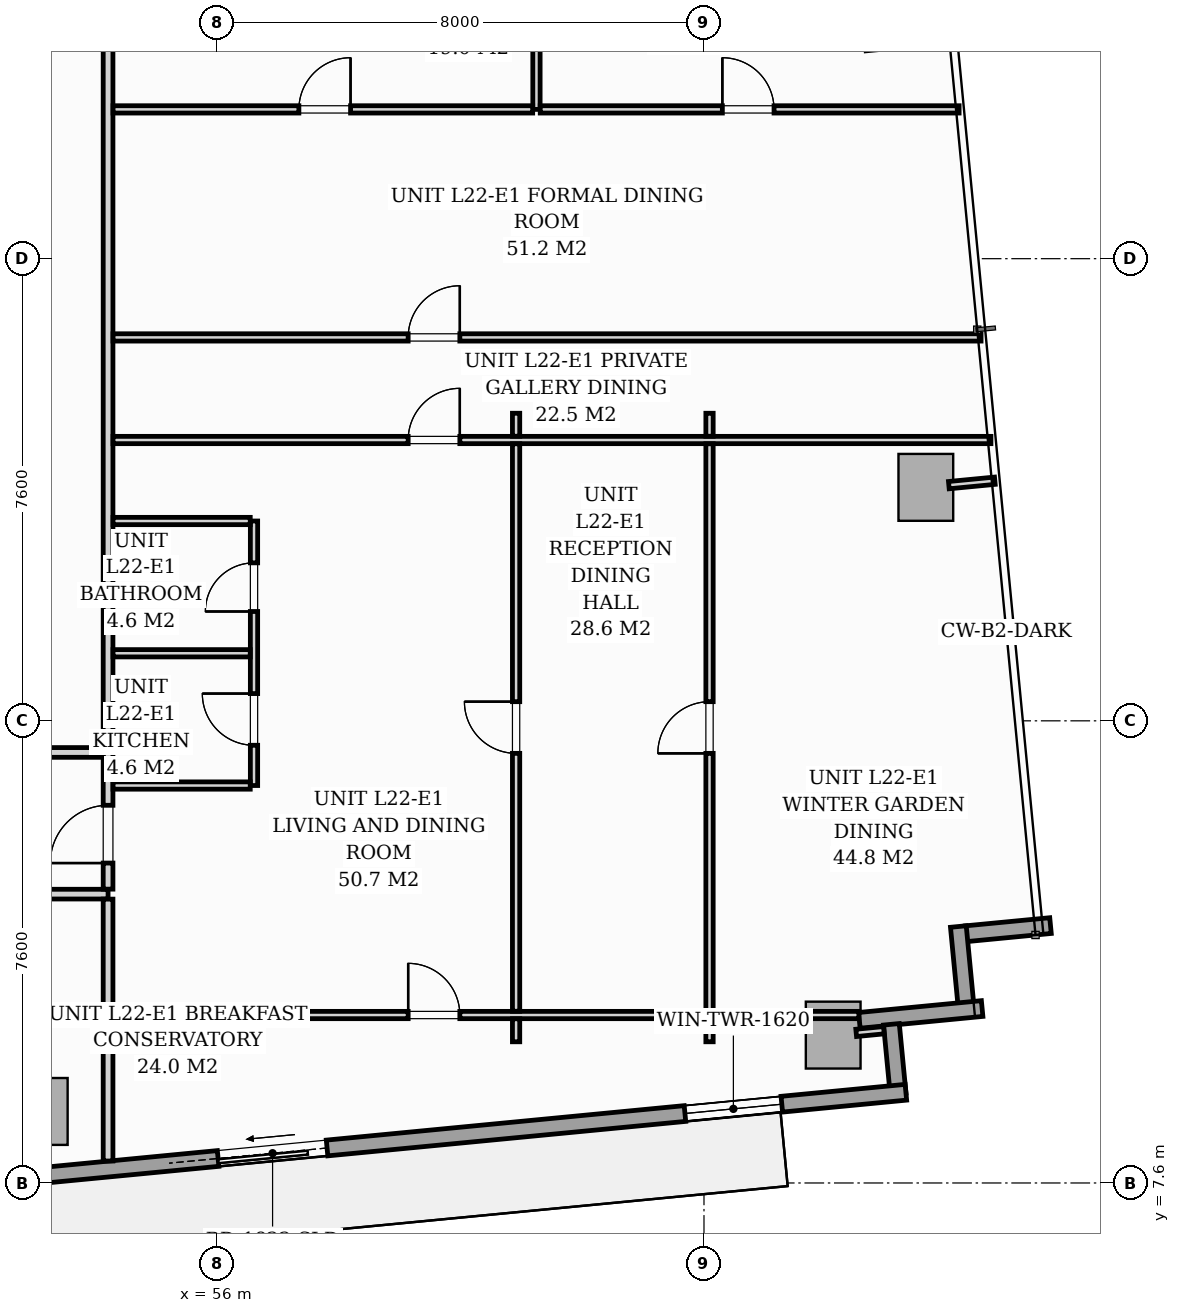
"""IFC4 building model, lengths in metres.
Left out: names, types, materials, properties, quantities, classifications, styles, units other than length and angle.
Written with IfcOpenShell. Run it as: python <this file> out.ifc"""

import sys

from ifc_helpers import new_model, si_unit, direction, frame, frame_2d, origin, origin_2d, place, context, subcontext, project, spatial, rectangle, extrude, source, transform, mapped, element, fill, save


model = new_model("IFC4")
c1 = context("Model", 3, precision=1e-05, world=origin(), true_north=direction((0.0, 1.0)))
c2 = subcontext(c1, "Body", "Model", "MODEL_VIEW")
j1 = project(units=[si_unit("LENGTHUNIT", "METRE"), si_unit("PLANEANGLEUNIT", "RADIAN")], contexts=[c1])
p1 = place(None, origin())
s1 = spatial("IfcSite", under=j1, at=p1, CompositionType="ELEMENT")
p2 = place(p1, origin())
s2 = spatial("IfcBuilding", under=s1, at=p2, CompositionType="ELEMENT")
p3 = place(p2, frame((0.0, 0.0, 81.0)))
s3 = spatial("IfcBuildingStorey", under=s2, at=p3, CompositionType="ELEMENT", Elevation=81.0)
m1 = source(origin(), c2, "Body", "SweptSolid", [
    extrude(rectangle(XDim=0.9, YDim=1.1, at=origin_2d()), origin(), (0.0, 0.0, 1.0), 3.196),
])
for number, where, z_axis, x_axis in (
    (1, (53.085, 8.776, 0.002), (0.0, 0.0, 1.0), (0.995, 0.096, 0.0)),
    (2, (66.125, 10.032, 0.002), (0.0, 0.0, 1.0), (0.995, 0.096, 0.0)),
    (3, (67.648, 19.039, 0.002), (0.0, 0.0, 1.0), (0.995, 0.096, 0.0)),
):
    element("IfcColumn", number, at=place(p3, frame(where, z_axis=z_axis, x_axis=x_axis)), inside=s3, PredefinedType="COLUMN", context=c2, shape_type="MappedRepresentation", body=[
        mapped(m1, transform((0.0, 0.0, 0.0), scale=1.0)),
    ])
for number, where, z_axis, x_axis in (
    (4, (69.698, 11.833, 0.0), (0.0, 0.0, 1.0), (-0.995, -0.096, 0.0)),
    (5, (68.183, 11.817, 0.0), (0.0, 0.0, 1.0), (0.096, -0.995, 0.0)),
):
    element("IfcWall", number, at=place(p3, frame(where, z_axis=z_axis, x_axis=x_axis)), inside=s3, PredefinedType="STANDARD", context=c2, shape_type="SweptSolid", body=[
        extrude(rectangle(XDim=1.395, YDim=0.26, at=frame_2d((0.697, 0.0))), origin(), (0.0, 0.0, 1.0), 2.94),
    ])
p4 = place(p3, frame((68.574, 10.469, 0.0), z_axis=(0.0, 0.0, 1.0), x_axis=(-0.99539865733, -0.095820211783, 0.0)))
e6 = element("IfcWall", 6, at=p4, inside=s3, PredefinedType="STANDARD", context=c2, shape_type="SweptSolid", body=[
    extrude(rectangle(XDim=2.028, YDim=0.26, at=frame_2d((1.014, 0.0))), origin(), (0.0, 0.0, 1.0), 2.94),
])
p5 = place(p3, frame((67.082, 10.209, 0.0), z_axis=(0.0, 0.0, 1.0), x_axis=(0.09576095695, -0.995404359607, 0.0)))
e7 = element("IfcWall", 7, at=p5, inside=s3, PredefinedType="STANDARD", context=c2, shape_type="SweptSolid", body=[
    extrude(rectangle(XDim=1.15, YDim=0.26, at=frame_2d((0.575, 0.0))), origin(), (0.0, 0.0, 1.0), 2.94),
])
p6 = place(p3, frame((67.32, 9.092, 0.0), z_axis=(0.0, 0.0, 1.0), x_axis=(-0.995396521236, -0.095842399342, 0.0)))
e8 = element("IfcWall", 8, at=p6, inside=s3, PredefinedType="STANDARD", context=c2, shape_type="SweptSolid", body=[
    extrude(rectangle(XDim=19.11, YDim=0.26, at=frame_2d((9.555, 0.0))), origin(), (0.0, 0.0, 1.0), 2.94),
])
p7 = place(p6, frame((9.563, 0.0, 0.0)))
e9 = element("IfcOpeningElement", 9, at=p7, cuts=e8, PredefinedType="OPENING", context=c2, shape_type="SweptSolid", body=[
    extrude(rectangle(XDim=1.8, YDim=2.06, at=frame_2d((0.9, 1.03))), frame((0.0, 0.14, 0.0), z_axis=(0.0, -1.0, 0.0), x_axis=(1.0, 0.0, 0.0)), (0.0, 0.0, 1.0), 0.28),
])
p8 = place(p6, frame((2.05, 0.0, 0.65)))
e10 = element("IfcOpeningElement", 10, at=p8, cuts=e8, PredefinedType="OPENING", context=c2, shape_type="SweptSolid", body=[
    extrude(rectangle(XDim=1.6, YDim=1.5, at=frame_2d((0.8, 0.75))), frame((0.0, 0.14, 0.0), z_axis=(0.0, -1.0, 0.0), x_axis=(1.0, 0.0, 0.0)), (0.0, 0.0, 1.0), 0.28),
])
p9 = place(p6, frame((14.465, 0.0, 0.75)))
e11 = element("IfcOpeningElement", 11, at=p9, cuts=e8, PredefinedType="OPENING", context=c2, shape_type="SweptSolid", body=[
    extrude(rectangle(XDim=1.6, YDim=1.5, at=frame_2d((0.8, 0.75))), frame((0.0, 0.14, 0.0), z_axis=(0.0, -1.0, 0.0), x_axis=(1.0, 0.0, 0.0)), (0.0, 0.0, 1.0), 0.28),
])
p10 = place(p3, frame((16.6, 12.35, 0.0), z_axis=(0.0, 0.0, 1.0), x_axis=(1.0, 0.0, 0.0)))
e12 = element("IfcWall", 12, at=p10, inside=s3, PredefinedType="PARTITIONING", context=c2, shape_type="SweptSolid", body=[
    extrude(rectangle(XDim=37.6, YDim=0.16, at=frame_2d((18.8, 0.0))), origin(), (0.0, 0.0, 1.0), 2.94),
])
p11 = place(p10, frame((2.091, 0.0, 0.0)))
e13 = element("IfcOpeningElement", 13, at=p11, cuts=e12, PredefinedType="OPENING", context=c2, shape_type="SweptSolid", body=[
    extrude(rectangle(XDim=0.95, YDim=2.06, at=frame_2d((0.475, 1.03))), frame((0.0, 0.09, 0.0), z_axis=(0.0, -1.0, 0.0), x_axis=(1.0, 0.0, 0.0)), (0.0, 0.0, 1.0), 0.18),
])
p12 = place(p10, frame((26.146, 0.0, 0.0)))
e14 = element("IfcOpeningElement", 14, at=p12, cuts=e12, PredefinedType="OPENING", context=c2, shape_type="SweptSolid", body=[
    extrude(rectangle(XDim=0.95, YDim=2.06, at=frame_2d((0.475, 1.03))), frame((0.0, 0.09, 0.0), z_axis=(0.0, -1.0, 0.0), x_axis=(1.0, 0.0, 0.0)), (0.0, 0.0, 1.0), 0.18),
])
p13 = place(p3, frame((54.2, 7.961, 0.0), z_axis=(0.0, 0.0, 1.0), x_axis=(0.0, 1.0, 0.0)))
e15 = element("IfcWall", 15, at=p13, inside=s3, PredefinedType="PARTITIONING", context=c2, shape_type="SweptSolid", body=[
    extrude(rectangle(XDim=4.307, YDim=0.16, at=frame_2d((2.153, 0.0))), origin(), (0.0, 0.0, 1.0), 2.94),
])
p14 = place(p3, frame((54.2, 12.432, 0.0), z_axis=(0.0, 0.0, 1.0), x_axis=(0.0, 1.0, 0.0)))
e16 = element("IfcWall", 16, at=p14, inside=s3, PredefinedType="PARTITIONING", context=c2, shape_type="SweptSolid", body=[
    extrude(rectangle(XDim=15.095, YDim=0.16, at=frame_2d((7.548, 0.0))), origin(), (0.0, 0.0, 1.0), 2.94),
])
p15 = place(p14, frame((0.429, 0.0, 0.0)))
e17 = element("IfcOpeningElement", 17, at=p15, cuts=e16, PredefinedType="OPENING", context=c2, shape_type="SweptSolid", body=[
    extrude(rectangle(XDim=0.95, YDim=2.06, at=frame_2d((0.475, 1.03))), frame((0.0, 0.09, 0.0), z_axis=(0.0, -1.0, 0.0), x_axis=(1.0, 0.0, 0.0)), (0.0, 0.0, 1.0), 0.18),
])
p16 = place(p3, frame((56.6, 14.136, 0.0), z_axis=(0.0, 0.0, 1.0), x_axis=(0.0, 1.0, 0.0)))
e18 = element("IfcWall", 18, at=p16, inside=s3, PredefinedType="PARTITIONING", context=c2, shape_type="SweptSolid", body=[
    extrude(rectangle(XDim=4.35, YDim=0.12, at=frame_2d((2.175, 0.0))), origin(), (0.0, 0.0, 1.0), 2.94),
])
p17 = place(p16, frame((0.662, 0.0, 0.0)))
e19 = element("IfcOpeningElement", 19, at=p17, cuts=e18, PredefinedType="OPENING", context=c2, shape_type="SweptSolid", body=[
    extrude(rectangle(XDim=0.85, YDim=2.05, at=frame_2d((0.425, 1.025))), frame((0.0, 0.07, 0.0), z_axis=(0.0, -1.0, 0.0), x_axis=(1.0, 0.0, 0.0)), (0.0, 0.0, 1.0), 0.14),
])
p18 = place(p16, frame((2.862, 0.0, 0.0)))
e20 = element("IfcOpeningElement", 20, at=p18, cuts=e18, PredefinedType="OPENING", context=c2, shape_type="SweptSolid", body=[
    extrude(rectangle(XDim=0.8, YDim=2.02, at=frame_2d((0.4, 1.01))), frame((0.0, 0.07, 0.0), z_axis=(0.0, -1.0, 0.0), x_axis=(1.0, 0.0, 0.0)), (0.0, 0.0, 1.0), 0.14),
])
for number, where, z_axis, x_axis in (
    (21, (54.282, 16.311, 0.0), (0.0, 0.0, 1.0), (1.0, 0.0, 0.0)),
    (22, (54.282, 14.136, 0.0), (0.0, 0.0, 1.0), (1.0, 0.0, 0.0)),
    (23, (54.282, 18.486, 0.0), (0.0, 0.0, 1.0), (1.0, 0.0, 0.0)),
):
    element("IfcWall", number, at=place(p3, frame(where, z_axis=z_axis, x_axis=x_axis)), inside=s3, PredefinedType="PARTITIONING", context=c2, shape_type="SweptSolid", body=[
        extrude(rectangle(XDim=2.256, YDim=0.12, at=frame_2d((1.128, 0.0))), origin(), (0.0, 0.0, 1.0), 2.94),
    ])
p19 = place(p3, frame((61.245, 25.255, 0.0), z_axis=(0.0, 0.0, 1.0), x_axis=(0.0, 1.0, 0.0)))
e24 = element("IfcWall", 24, at=p19, inside=s3, PredefinedType="PARTITIONING", context=c2, shape_type="SweptSolid", body=[
    extrude(rectangle(XDim=2.951, YDim=0.12, at=frame_2d((1.476, 0.0))), origin(), (0.0, 0.0, 1.0), 2.94),
])
p20 = place(p3, frame((54.282, 25.255, 0.0), z_axis=(0.0, 0.0, 1.0), x_axis=(1.0, 0.0, 0.0)))
e25 = element("IfcWall", 25, at=p20, inside=s3, PredefinedType="PARTITIONING", context=c2, shape_type="SweptSolid", body=[
    extrude(rectangle(XDim=6.901, YDim=0.12, at=frame_2d((3.451, 0.0))), origin(), (0.0, 0.0, 1.0), 2.94),
])
p21 = place(p20, frame((3.056, 0.0, 0.0)))
e26 = element("IfcOpeningElement", 26, at=p21, cuts=e25, PredefinedType="OPENING", context=c2, shape_type="SweptSolid", body=[
    extrude(rectangle(XDim=0.85, YDim=2.05, at=frame_2d((0.425, 1.025))), frame((0.0, 0.07, 0.0), z_axis=(0.0, -1.0, 0.0), x_axis=(1.0, 0.0, 0.0)), (0.0, 0.0, 1.0), 0.14),
])
p22 = place(p3, frame((61.307, 25.255, 0.0), z_axis=(0.0, 0.0, 1.0), x_axis=(1.0, 0.0, 0.0)))
e27 = element("IfcWall", 27, at=p22, inside=s3, PredefinedType="PARTITIONING", context=c2, shape_type="SweptSolid", body=[
    extrude(rectangle(XDim=6.888, YDim=0.12, at=frame_2d((3.444, 0.0))), origin(), (0.0, 0.0, 1.0), 2.94),
])
p23 = place(p22, frame((2.995, 0.0, 0.0)))
e28 = element("IfcOpeningElement", 28, at=p23, cuts=e27, PredefinedType="OPENING", context=c2, shape_type="SweptSolid", body=[
    extrude(rectangle(XDim=0.85, YDim=2.05, at=frame_2d((0.425, 1.025))), frame((0.0, 0.07, 0.0), z_axis=(0.0, -1.0, 0.0), x_axis=(1.0, 0.0, 0.0)), (0.0, 0.0, 1.0), 0.14),
])
p24 = place(p3, frame((54.282, 21.505, 0.0), z_axis=(0.0, 0.0, 1.0), x_axis=(1.0, 0.0, 0.0)))
e29 = element("IfcWall", 29, at=p24, inside=s3, PredefinedType="PARTITIONING", context=c2, shape_type="SweptSolid", body=[
    extrude(rectangle(XDim=14.274, YDim=0.12, at=frame_2d((7.137, 0.0))), origin(), (0.0, 0.0, 1.0), 2.94),
])
p25 = place(p24, frame((4.853, 0.0, 0.0)))
e30 = element("IfcOpeningElement", 30, at=p25, cuts=e29, PredefinedType="OPENING", context=c2, shape_type="SweptSolid", body=[
    extrude(rectangle(XDim=0.85, YDim=2.05, at=frame_2d((0.425, 1.025))), frame((0.0, 0.07, 0.0), z_axis=(0.0, -1.0, 0.0), x_axis=(1.0, 0.0, 0.0)), (0.0, 0.0, 1.0), 0.14),
])
p26 = place(p3, frame((54.282, 10.362, 0.0), z_axis=(0.0, 0.0, 1.0), x_axis=(1.0, 0.0, 0.0)))
e31 = element("IfcWall", 31, at=p26, inside=s3, PredefinedType="PARTITIONING", context=c2, shape_type="SweptSolid", body=[
    extrude(rectangle(XDim=12.265, YDim=0.12, at=frame_2d((6.132, 0.0))), origin(), (0.0, 0.0, 1.0), 2.94),
])
p27 = place(p26, frame((4.853, 0.0, 0.0)))
e32 = element("IfcOpeningElement", 32, at=p27, cuts=e31, PredefinedType="OPENING", context=c2, shape_type="SweptSolid", body=[
    extrude(rectangle(XDim=0.85, YDim=2.05, at=frame_2d((0.425, 1.025))), frame((0.0, 0.07, 0.0), z_axis=(0.0, -1.0, 0.0), x_axis=(1.0, 0.0, 0.0)), (0.0, 0.0, 1.0), 0.14),
])
p28 = place(p3, frame((54.282, 19.818, 0.0), z_axis=(0.0, 0.0, 1.0), x_axis=(1.0, 0.0, 0.0)))
e33 = element("IfcWall", 33, at=p28, inside=s3, PredefinedType="PARTITIONING", context=c2, shape_type="SweptSolid", body=[
    extrude(rectangle(XDim=14.437, YDim=0.12, at=frame_2d((7.218, 0.0))), origin(), (0.0, 0.0, 1.0), 2.94),
])
p29 = place(p28, frame((4.853, 0.0, 0.0)))
e34 = element("IfcOpeningElement", 34, at=p29, cuts=e33, PredefinedType="OPENING", context=c2, shape_type="SweptSolid", body=[
    extrude(rectangle(XDim=0.85, YDim=2.05, at=frame_2d((0.425, 1.025))), frame((0.0, 0.07, 0.0), z_axis=(0.0, -1.0, 0.0), x_axis=(1.0, 0.0, 0.0)), (0.0, 0.0, 1.0), 0.14),
])
p30 = place(p3, frame((64.091, 9.922, 0.0), z_axis=(0.0, 0.0, 1.0), x_axis=(0.0, 1.0, 0.0)))
e35 = element("IfcWall", 35, at=p30, inside=s3, PredefinedType="PARTITIONING", context=c2, shape_type="SweptSolid", body=[
    extrude(rectangle(XDim=0.378, YDim=0.12, at=frame_2d((0.189, 0.0))), origin(), (0.0, 0.0, 1.0), 2.94),
])
p31 = place(p3, frame((64.091, 10.424, 0.0), z_axis=(0.0, 0.0, 1.0), x_axis=(0.0, 1.0, 0.0)))
e36 = element("IfcWall", 36, at=p31, inside=s3, PredefinedType="PARTITIONING", context=c2, shape_type="SweptSolid", body=[
    extrude(rectangle(XDim=9.332, YDim=0.12, at=frame_2d((4.666, 0.0))), origin(), (0.0, 0.0, 1.0), 2.94),
])
p32 = place(p31, frame((4.241, 0.0, 0.0)))
e37 = element("IfcOpeningElement", 37, at=p32, cuts=e36, PredefinedType="OPENING", context=c2, shape_type="SweptSolid", body=[
    extrude(rectangle(XDim=0.85, YDim=2.05, at=frame_2d((0.425, 1.025))), frame((0.0, 0.07, 0.0), z_axis=(0.0, -1.0, 0.0), x_axis=(1.0, 0.0, 0.0)), (0.0, 0.0, 1.0), 0.14),
])
p33 = place(p3, frame((64.091, 19.88, 0.0), z_axis=(0.0, 0.0, 1.0), x_axis=(0.0, 1.0, 0.0)))
e38 = element("IfcWall", 38, at=p33, inside=s3, PredefinedType="PARTITIONING", context=c2, shape_type="SweptSolid", body=[
    extrude(rectangle(XDim=0.378, YDim=0.12, at=frame_2d((0.189, 0.0))), origin(), (0.0, 0.0, 1.0), 2.94),
])
p34 = place(p3, frame((60.91, 9.922, 0.0), z_axis=(0.0, 0.0, 1.0), x_axis=(0.0, 1.0, 0.0)))
e39 = element("IfcWall", 39, at=p34, inside=s3, PredefinedType="PARTITIONING", context=c2, shape_type="SweptSolid", body=[
    extrude(rectangle(XDim=0.378, YDim=0.12, at=frame_2d((0.189, 0.0))), origin(), (0.0, 0.0, 1.0), 2.94),
])
p35 = place(p3, frame((60.91, 10.424, 0.0), z_axis=(0.0, 0.0, 1.0), x_axis=(0.0, 1.0, 0.0)))
e40 = element("IfcWall", 40, at=p35, inside=s3, PredefinedType="PARTITIONING", context=c2, shape_type="SweptSolid", body=[
    extrude(rectangle(XDim=9.332, YDim=0.12, at=frame_2d((4.666, 0.0))), origin(), (0.0, 0.0, 1.0), 2.94),
])
p36 = place(p35, frame((4.241, 0.0, 0.0)))
e41 = element("IfcOpeningElement", 41, at=p36, cuts=e40, PredefinedType="OPENING", context=c2, shape_type="SweptSolid", body=[
    extrude(rectangle(XDim=0.85, YDim=2.05, at=frame_2d((0.425, 1.025))), frame((0.0, 0.07, 0.0), z_axis=(0.0, -1.0, 0.0), x_axis=(1.0, 0.0, 0.0)), (0.0, 0.0, 1.0), 0.14),
])
p37 = place(p3, frame((60.91, 19.88, 0.0), z_axis=(0.0, 0.0, 1.0), x_axis=(0.0, 1.0, 0.0)))
e42 = element("IfcWall", 42, at=p37, inside=s3, PredefinedType="PARTITIONING", context=c2, shape_type="SweptSolid", body=[
    extrude(rectangle(XDim=0.378, YDim=0.12, at=frame_2d((0.189, 0.0))), origin(), (0.0, 0.0, 1.0), 2.94),
])
p38 = place(p3, frame((45.84, 14.68, 0.0), z_axis=(0.0, 0.0, 1.0), x_axis=(1.0, 0.0, 0.0)))
e43 = element("IfcWall", 43, at=p38, inside=s3, PredefinedType="PARTITIONING", context=c2, shape_type="SweptSolid", body=[
    extrude(rectangle(XDim=8.278, YDim=0.16, at=frame_2d((4.139, 0.0))), origin(), (0.0, 0.0, 1.0), 2.94),
])
p39 = place(p38, frame((3.765, 0.0, 0.0)))
e44 = element("IfcOpeningElement", 44, at=p39, cuts=e43, PredefinedType="OPENING", context=c2, shape_type="SweptSolid", body=[
    extrude(rectangle(XDim=0.95, YDim=2.06, at=frame_2d((0.475, 1.03))), frame((0.0, 0.09, 0.0), z_axis=(0.0, -1.0, 0.0), x_axis=(1.0, 0.0, 0.0)), (0.0, 0.0, 1.0), 0.18),
])
p40 = place(p3, frame((66.503, 10.068, 0.0), z_axis=(0.0, 0.0, 1.0), x_axis=(0.995389482415, 0.095915474751, 0.0)))
e45 = element("IfcWall", 45, at=p40, inside=s3, PredefinedType="PARTITIONING", context=c2, shape_type="SweptSolid", body=[
    extrude(rectangle(XDim=0.458, YDim=0.12, at=frame_2d((0.229, 0.0))), origin(), (0.0, 0.0, 1.0), 2.94),
])
p41 = place(p3, frame((68.027, 19.076, 0.0), z_axis=(0.0, 0.0, 1.0), x_axis=(0.995377786728, 0.096036772582, 0.0)))
e46 = element("IfcWall", 46, at=p41, inside=s3, PredefinedType="PARTITIONING", context=c2, shape_type="SweptSolid", body=[
    extrude(rectangle(XDim=0.76, YDim=0.12, at=frame_2d((0.38, 0.0))), origin(), (0.0, 0.0, 1.0), 2.94),
])
m2 = source(origin(), c2, "Body", "SweptSolid", [
    extrude(rectangle(XDim=1.8, YDim=2.06, at=frame_2d((0.9, 1.03))), frame((0.0, 0.025, 0.0), z_axis=(0.0, -1.0, 0.0), x_axis=(1.0, 0.0, 0.0)), (0.0, 0.0, 1.0), 0.05),
])
p42 = place(p7, origin())
e47 = element("IfcDoor", 47, at=p42, inside=s3, OperationType="SLIDING_TO_RIGHT", PredefinedType="DOOR", context=c2, shape_type="MappedRepresentation", body=[
    mapped(m2, transform((0.0, 0.0, 0.0), scale=1.0)),
])
fill(e9, e47)
m3 = source(origin(), c2, "Body", "SweptSolid", [
    extrude(rectangle(XDim=1.6, YDim=1.5, at=frame_2d((0.8, 0.75))), frame((0.0, 0.03, 0.0), z_axis=(0.0, -1.0, 0.0), x_axis=(1.0, 0.0, 0.0)), (0.0, 0.0, 1.0), 0.06),
])
p43 = place(p8, origin())
e48 = element("IfcWindow", 48, at=p43, inside=s3, PartitioningType="SINGLE_PANEL", PredefinedType="WINDOW", context=c2, shape_type="MappedRepresentation", body=[
    mapped(m3, transform((0.0, 0.0, 0.0), scale=1.0)),
])
fill(e10, e48)
m4 = source(origin(), c2, "Body", "SweptSolid", [
    extrude(rectangle(XDim=0.95, YDim=2.06, at=frame_2d((0.475, 1.03))), frame((0.0, 0.025, 0.0), z_axis=(0.0, -1.0, 0.0), x_axis=(1.0, 0.0, 0.0)), (0.0, 0.0, 1.0), 0.05),
])
p44 = place(p15, origin())
e49 = element("IfcDoor", 49, at=p44, inside=s3, OperationType="SINGLE_SWING_LEFT", PredefinedType="DOOR", context=c2, shape_type="MappedRepresentation", body=[
    mapped(m4, transform((0.0, 0.0, 0.0), scale=1.0)),
])
fill(e17, e49)
m5 = source(origin(), c2, "Body", "SweptSolid", [
    extrude(rectangle(XDim=0.85, YDim=2.05, at=frame_2d((0.425, 1.025))), frame((0.0, 0.025, 0.0), z_axis=(0.0, -1.0, 0.0), x_axis=(1.0, 0.0, 0.0)), (0.0, 0.0, 1.0), 0.05),
])
p45 = place(p17, origin())
e50 = element("IfcDoor", 50, at=p45, inside=s3, OperationType="SINGLE_SWING_RIGHT", PredefinedType="DOOR", context=c2, shape_type="MappedRepresentation", body=[
    mapped(m5, transform((0.0, 0.0, 0.0), scale=1.0)),
])
fill(e19, e50)
m6 = source(origin(), c2, "Body", "SweptSolid", [
    extrude(rectangle(XDim=0.8, YDim=2.02, at=frame_2d((0.4, 1.01))), frame((0.0, 0.025, 0.0), z_axis=(0.0, -1.0, 0.0), x_axis=(1.0, 0.0, 0.0)), (0.0, 0.0, 1.0), 0.05),
])
p46 = place(p18, origin())
e51 = element("IfcDoor", 51, at=p46, inside=s3, OperationType="SINGLE_SWING_LEFT", PredefinedType="DOOR", context=c2, shape_type="MappedRepresentation", body=[
    mapped(m6, transform((0.0, 0.0, 0.0), scale=1.0)),
])
fill(e20, e51)
p47 = place(p21, origin())
e52 = element("IfcDoor", 52, at=p47, inside=s3, OperationType="SINGLE_SWING_RIGHT", PredefinedType="DOOR", context=c2, shape_type="MappedRepresentation", body=[
    mapped(m5, transform((0.0, 0.0, 0.0), scale=1.0)),
])
fill(e26, e52)
p48 = place(p23, origin())
e53 = element("IfcDoor", 53, at=p48, inside=s3, OperationType="SINGLE_SWING_LEFT", PredefinedType="DOOR", context=c2, shape_type="MappedRepresentation", body=[
    mapped(m5, transform((0.0, 0.0, 0.0), scale=1.0)),
])
fill(e28, e53)
p49 = place(p25, origin())
e54 = element("IfcDoor", 54, at=p49, inside=s3, OperationType="SINGLE_SWING_RIGHT", PredefinedType="DOOR", context=c2, shape_type="MappedRepresentation", body=[
    mapped(m5, transform((0.0, 0.0, 0.0), scale=1.0)),
])
fill(e30, e54)
p50 = place(p27, origin())
e55 = element("IfcDoor", 55, at=p50, inside=s3, OperationType="SINGLE_SWING_LEFT", PredefinedType="DOOR", context=c2, shape_type="MappedRepresentation", body=[
    mapped(m5, transform((0.0, 0.0, 0.0), scale=1.0)),
])
fill(e32, e55)
p51 = place(p29, origin())
e56 = element("IfcDoor", 56, at=p51, inside=s3, OperationType="SINGLE_SWING_RIGHT", PredefinedType="DOOR", context=c2, shape_type="MappedRepresentation", body=[
    mapped(m5, transform((0.0, 0.0, 0.0), scale=1.0)),
])
fill(e34, e56)
p52 = place(p32, origin())
e57 = element("IfcDoor", 57, at=p52, inside=s3, OperationType="SINGLE_SWING_LEFT", PredefinedType="DOOR", context=c2, shape_type="MappedRepresentation", body=[
    mapped(m5, transform((0.0, 0.0, 0.0), scale=1.0)),
])
fill(e37, e57)
p53 = place(p36, origin())
e58 = element("IfcDoor", 58, at=p53, inside=s3, OperationType="SINGLE_SWING_RIGHT", PredefinedType="DOOR", context=c2, shape_type="MappedRepresentation", body=[
    mapped(m5, transform((0.0, 0.0, 0.0), scale=1.0)),
])
fill(e41, e58)
save(model, sys.argv[1])
